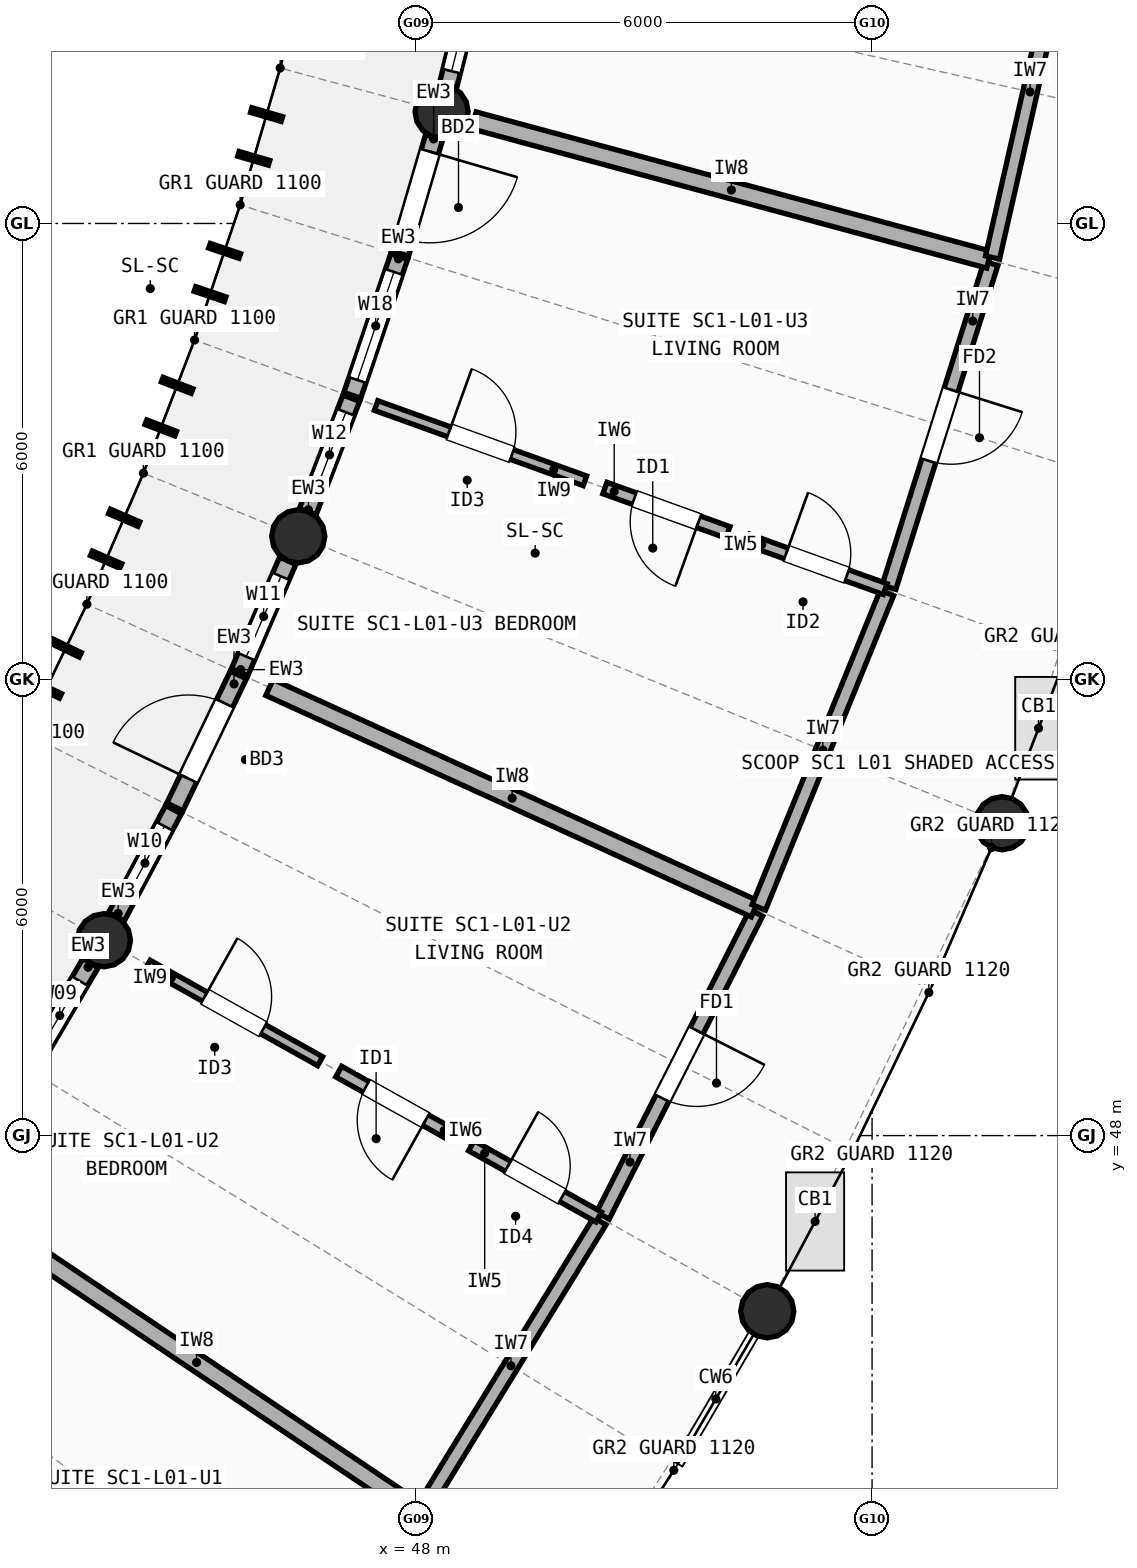
"""IFC4 building model, lengths in metres.
Left out: names, types, materials, properties, quantities, classifications, styles, units other than length and angle.
Written with IfcOpenShell. Run it as: python <this file> out.ifc"""

import sys

from ifc_helpers import new_model, si_unit, direction, frame, frame_2d, origin, origin_2d, place, context, subcontext, project, spatial, rectangle, circle, extrude, element, fill, save


model = new_model("IFC4")
c1 = context("Model", 3, precision=1e-05, world=origin(), true_north=direction((0.0, 1.0)))
c2 = subcontext(c1, "Body", "Model", "MODEL_VIEW")
j1 = project(units=[si_unit("LENGTHUNIT", "METRE"), si_unit("PLANEANGLEUNIT", "RADIAN")], contexts=[c1])
p1 = place(None, origin())
s1 = spatial("IfcSite", under=j1, at=p1, CompositionType="ELEMENT")
p2 = place(p1, origin())
s2 = spatial("IfcBuilding", under=s1, at=p2, CompositionType="ELEMENT")
p3 = place(p2, frame((0.0, 0.0, 4.5)))
s3 = spatial("IfcBuildingStorey", under=s2, at=p3, CompositionType="ELEMENT", Elevation=4.5)
for number, where, z_axis, x_axis in (
    (1, (43.893, 50.57, 0.0), (0.0, 0.0, 1.0), (1.0, 0.0, 0.0)),
    (2, (52.621, 45.689, 0.0), (0.0, 0.0, 1.0), (1.0, 0.0, 0.0)),
    (3, (46.45, 55.884, 0.0), (0.0, 0.0, 1.0), (1.0, 0.0, 0.0)),
    (4, (55.71, 52.11, 0.0), (0.0, 0.0, 1.0), (1.0, 0.0, 0.0)),
    (5, (48.336, 61.471, 0.0), (0.0, 0.0, 1.0), (1.0, 0.0, 0.0)),
):
    element("IfcColumn", number, at=place(p3, frame(where, z_axis=z_axis, x_axis=x_axis)), inside=s3, PredefinedType="COLUMN", context=c2, shape_type="SweptSolid", body=[
        extrude(circle(Radius=0.35, at=origin_2d()), origin(), (0.0, 0.0, 1.0), 2.948),
    ])
p4 = place(p3, frame((42.908, 48.891, 0.0), z_axis=(0.0, 0.0, 1.0), x_axis=(0.505970625323, 0.862550709414, 0.0)))
e6 = element("IfcWall", 6, at=p4, inside=s3, PredefinedType="STANDARD", context=c2, shape_type="SweptSolid", body=[
    extrude(rectangle(XDim=1.597, YDim=0.235, at=frame_2d((0.798, 0.0))), origin(), (0.0, 0.0, 1.0), 2.684),
])
p5 = place(p4, frame((0.273, 0.0, 0.85)))
e7 = element("IfcOpeningElement", 7, at=p5, cuts=e6, PredefinedType="OPENING", context=c2, shape_type="SweptSolid", body=[
    extrude(rectangle(XDim=1.05, YDim=1.35, at=frame_2d((0.525, 0.675))), frame((0.0, 0.127, 0.0), z_axis=(0.0, -1.0, 0.0), x_axis=(1.0, 0.0, 0.0)), (0.0, 0.0, 1.0), 0.255),
])
p6 = place(p3, frame((44.058, 50.879, 0.0), z_axis=(0.0, 0.0, 1.0), x_axis=(0.470183436771, 0.882568714484, 0.0)))
e8 = element("IfcWall", 8, at=p6, inside=s3, PredefinedType="STANDARD", context=c2, shape_type="SweptSolid", body=[
    extrude(rectangle(XDim=1.597, YDim=0.235, at=frame_2d((0.798, 0.0))), origin(), (0.0, 0.0, 1.0), 2.684),
])
p7 = place(p6, frame((0.248, 0.0, 0.85)))
e9 = element("IfcOpeningElement", 9, at=p7, cuts=e8, PredefinedType="OPENING", context=c2, shape_type="SweptSolid", body=[
    extrude(rectangle(XDim=1.1, YDim=1.45, at=frame_2d((0.55, 0.725))), frame((0.0, 0.127, 0.0), z_axis=(0.0, -1.0, 0.0), x_axis=(1.0, 0.0, 0.0)), (0.0, 0.0, 1.0), 0.255),
])
p8 = place(p3, frame((44.826, 52.324, 0.0), z_axis=(0.0, 0.0, 1.0), x_axis=(0.433579410465, 0.90111536155, 0.0)))
e10 = element("IfcWall", 10, at=p8, inside=s3, PredefinedType="STANDARD", context=c2, shape_type="SweptSolid", body=[
    extrude(rectangle(XDim=1.927, YDim=0.235, at=frame_2d((0.963, 0.0))), origin(), (0.0, 0.0, 1.0), 2.684),
])
p9 = place(p8, frame((0.413, 0.0, 0.0)))
e11 = element("IfcOpeningElement", 11, at=p9, cuts=e10, PredefinedType="OPENING", context=c2, shape_type="SweptSolid", body=[
    extrude(rectangle(XDim=1.1, YDim=2.15, at=frame_2d((0.55, 1.075))), frame((0.0, 0.127, 0.0), z_axis=(0.0, -1.0, 0.0), x_axis=(1.0, 0.0, 0.0)), (0.0, 0.0, 1.0), 0.255),
])
p10 = place(p3, frame((45.678, 54.097, 0.0), z_axis=(0.0, 0.0, 1.0), x_axis=(0.396353998836, 0.918097765822, 0.0)))
e12 = element("IfcWall", 12, at=p10, inside=s3, PredefinedType="STANDARD", context=c2, shape_type="SweptSolid", body=[
    extrude(rectangle(XDim=1.597, YDim=0.235, at=frame_2d((0.798, 0.0))), origin(), (0.0, 0.0, 1.0), 2.684),
])
p11 = place(p10, frame((0.223, 0.0, 0.85)))
e13 = element("IfcOpeningElement", 13, at=p11, cuts=e12, PredefinedType="OPENING", context=c2, shape_type="SweptSolid", body=[
    extrude(rectangle(XDim=1.15, YDim=1.45, at=frame_2d((0.575, 0.725))), frame((0.0, 0.127, 0.0), z_axis=(0.0, -1.0, 0.0), x_axis=(1.0, 0.0, 0.0)), (0.0, 0.0, 1.0), 0.255),
])
p12 = place(p3, frame((46.575, 56.211, 0.0), z_axis=(0.0, 0.0, 1.0), x_axis=(0.358384767005, 0.933573970705, 0.0)))
e14 = element("IfcWall", 14, at=p12, inside=s3, PredefinedType="STANDARD", context=c2, shape_type="SweptSolid", body=[
    extrude(rectangle(XDim=1.597, YDim=0.235, at=frame_2d((0.798, 0.0))), origin(), (0.0, 0.0, 1.0), 2.684),
])
p13 = place(p12, frame((0.198, 0.0, 0.85)))
e15 = element("IfcOpeningElement", 15, at=p13, cuts=e14, PredefinedType="OPENING", context=c2, shape_type="SweptSolid", body=[
    extrude(rectangle(XDim=1.2, YDim=1.35, at=frame_2d((0.6, 0.675))), frame((0.0, 0.127, 0.0), z_axis=(0.0, -1.0, 0.0), x_axis=(1.0, 0.0, 0.0)), (0.0, 0.0, 1.0), 0.255),
])
p14 = place(p3, frame((47.161, 57.739, 0.0), z_axis=(0.0, 0.0, 1.0), x_axis=(0.319798549746, 0.947485560618, 0.0)))
e16 = element("IfcWall", 16, at=p14, inside=s3, PredefinedType="STANDARD", context=c2, shape_type="SweptSolid", body=[
    extrude(rectangle(XDim=1.927, YDim=0.235, at=frame_2d((0.963, 0.0))), origin(), (0.0, 0.0, 1.0), 2.684),
])
p15 = place(p14, frame((0.213, 0.0, 0.85)))
e17 = element("IfcOpeningElement", 17, at=p15, cuts=e16, PredefinedType="OPENING", context=c2, shape_type="SweptSolid", body=[
    extrude(rectangle(XDim=1.5, YDim=1.4, at=frame_2d((0.75, 0.7))), frame((0.0, 0.127, 0.0), z_axis=(0.0, -1.0, 0.0), x_axis=(1.0, 0.0, 0.0)), (0.0, 0.0, 1.0), 0.255),
])
p16 = place(p3, frame((47.79, 59.603, 0.0), z_axis=(0.0, 0.0, 1.0), x_axis=(0.28073386291, 0.959785652224, 0.0)))
e18 = element("IfcWall", 18, at=p16, inside=s3, PredefinedType="STANDARD", context=c2, shape_type="SweptSolid", body=[
    extrude(rectangle(XDim=1.597, YDim=0.235, at=frame_2d((0.798, 0.0))), origin(), (0.0, 0.0, 1.0), 2.684),
])
p17 = place(p16, frame((0.198, 0.0, 0.0)))
e19 = element("IfcOpeningElement", 19, at=p17, cuts=e18, PredefinedType="OPENING", context=c2, shape_type="SweptSolid", body=[
    extrude(rectangle(XDim=1.2, YDim=2.15, at=frame_2d((0.6, 1.075))), frame((0.0, 0.127, 0.0), z_axis=(0.0, -1.0, 0.0), x_axis=(1.0, 0.0, 0.0)), (0.0, 0.0, 1.0), 0.255),
])
p18 = place(p3, frame((48.42, 61.811, 0.0), z_axis=(0.0, 0.0, 1.0), x_axis=(0.241240447943, 0.970465376135, 0.0)))
e20 = element("IfcWall", 20, at=p18, inside=s3, PredefinedType="STANDARD", context=c2, shape_type="SweptSolid", body=[
    extrude(rectangle(XDim=1.597, YDim=0.235, at=frame_2d((0.798, 0.0))), origin(), (0.0, 0.0, 1.0), 2.684),
])
p19 = place(p18, frame((0.198, 0.0, 0.85)))
e21 = element("IfcOpeningElement", 21, at=p19, cuts=e20, PredefinedType="OPENING", context=c2, shape_type="SweptSolid", body=[
    extrude(rectangle(XDim=1.2, YDim=1.5, at=frame_2d((0.6, 0.75))), frame((0.0, 0.127, 0.0), z_axis=(0.0, -1.0, 0.0), x_axis=(1.0, 0.0, 0.0)), (0.0, 0.0, 1.0), 0.255),
])
p20 = place(p3, frame((42.2, 46.974, 0.0), z_axis=(0.0, 0.0, 1.0), x_axis=(0.82987699708, -0.55794638606, 0.0)))
e22 = element("IfcWall", 22, at=p20, inside=s3, PredefinedType="SOLIDWALL", context=c2, shape_type="SweptSolid", body=[
    extrude(rectangle(XDim=7.02, YDim=0.23, at=frame_2d((3.51, 0.0))), origin(), (0.0, 0.0, 1.0), 2.742),
])
p21 = place(p3, frame((48.08, 43.069, 0.0), z_axis=(0.0, 0.0, 1.0), x_axis=(0.523444746739, 0.852059620632, 0.0)))
e23 = element("IfcWall", 23, at=p21, inside=s3, PredefinedType="SOLIDWALL", context=c2, shape_type="SweptSolid", body=[
    extrude(rectangle(XDim=4.467, YDim=0.19, at=frame_2d((2.234, 0.0))), origin(), (0.0, 0.0, 1.0), 2.762),
])
p22 = place(p3, frame((50.457, 46.945, 0.0), z_axis=(0.0, 0.0, 1.0), x_axis=(0.451972910967, 0.892031662976, 0.0)))
e24 = element("IfcWall", 24, at=p22, inside=s3, PredefinedType="SOLIDWALL", context=c2, shape_type="SweptSolid", body=[
    extrude(rectangle(XDim=4.467, YDim=0.19, at=frame_2d((2.234, 0.0))), origin(), (0.0, 0.0, 1.0), 2.742),
])
p23 = place(p22, frame((1.734, 0.0, 0.0)))
e25 = element("IfcOpeningElement", 25, at=p23, cuts=e24, PredefinedType="OPENING", context=c2, shape_type="SweptSolid", body=[
    extrude(rectangle(XDim=1.0, YDim=2.15, at=frame_2d((0.5, 1.075))), frame((0.0, 0.105, 0.0), z_axis=(0.0, -1.0, 0.0), x_axis=(1.0, 0.0, 0.0)), (0.0, 0.0, 1.0), 0.21),
])
p24 = place(p3, frame((44.469, 50.248, 0.0), z_axis=(0.0, 0.0, 1.0), x_axis=(0.872794081277, -0.488088610487, 0.0)))
e26 = element("IfcWall", 26, at=p24, inside=s3, PredefinedType="PARTITIONING", context=c2, shape_type="SweptSolid", body=[
    extrude(rectangle(XDim=2.6, YDim=0.135, at=frame_2d((1.3, 0.0))), origin(), (0.0, 0.0, 1.0), 2.722),
])
p25 = place(p24, frame((0.86, 0.0, 0.0)))
e27 = element("IfcOpeningElement", 27, at=p25, cuts=e26, PredefinedType="OPENING", context=c2, shape_type="SweptSolid", body=[
    extrude(rectangle(XDim=0.88, YDim=2.1, at=frame_2d((0.44, 1.05))), frame((0.0, 0.077, 0.0), z_axis=(0.0, -1.0, 0.0), x_axis=(1.0, 0.0, 0.0)), (0.0, 0.0, 1.0), 0.155),
])
p26 = place(p3, frame((46.983, 48.842, 0.0), z_axis=(0.0, 0.0, 1.0), x_axis=(0.872774545553, -0.48812354239, 0.0)))
e28 = element("IfcWall", 28, at=p26, inside=s3, PredefinedType="PLUMBINGWALL", context=c2, shape_type="SweptSolid", body=[
    extrude(rectangle(XDim=1.72, YDim=0.16, at=frame_2d((0.86, 0.0))), origin(), (0.0, 0.0, 1.0), 2.722),
])
p27 = place(p26, frame((0.41, 0.0, 0.0)))
e29 = element("IfcOpeningElement", 29, at=p27, cuts=e28, PredefinedType="OPENING", context=c2, shape_type="SweptSolid", body=[
    extrude(rectangle(XDim=0.9, YDim=2.1, at=frame_2d((0.45, 1.05))), frame((0.0, 0.09, 0.0), z_axis=(0.0, -1.0, 0.0), x_axis=(1.0, 0.0, 0.0)), (0.0, 0.0, 1.0), 0.18),
])
p28 = place(p3, frame((48.728, 47.866, 0.0), z_axis=(0.0, 0.0, 1.0), x_axis=(0.8728224149, -0.488037941198, 0.0)))
e30 = element("IfcWall", 30, at=p28, inside=s3, PredefinedType="PARTITIONING", context=c2, shape_type="SweptSolid", body=[
    extrude(rectangle(XDim=1.92, YDim=0.15, at=frame_2d((0.96, 0.0))), origin(), (0.0, 0.0, 1.0), 2.722),
])
p29 = place(p28, frame((0.55, 0.0, 0.0)))
e31 = element("IfcOpeningElement", 31, at=p29, cuts=e30, PredefinedType="OPENING", context=c2, shape_type="SweptSolid", body=[
    extrude(rectangle(XDim=0.82, YDim=2.08, at=frame_2d((0.41, 1.04))), frame((0.0, 0.085, 0.0), z_axis=(0.0, -1.0, 0.0), x_axis=(1.0, 0.0, 0.0)), (0.0, 0.0, 1.0), 0.17),
])
p30 = place(p3, frame((46.071, 53.896, 0.0), z_axis=(0.0, 0.0, 1.0), x_axis=(0.909807068599, -0.415031442095, 0.0)))
e32 = element("IfcWall", 32, at=p30, inside=s3, PredefinedType="SOLIDWALL", context=c2, shape_type="SweptSolid", body=[
    extrude(rectangle(XDim=7.02, YDim=0.23, at=frame_2d((3.51, 0.0))), origin(), (0.0, 0.0, 1.0), 2.762),
])
p31 = place(p3, frame((52.509, 51.002, 0.0), z_axis=(0.0, 0.0, 1.0), x_axis=(0.377413192487, 0.926044967665, 0.0)))
e33 = element("IfcWall", 33, at=p31, inside=s3, PredefinedType="SOLIDWALL", context=c2, shape_type="SweptSolid", body=[
    extrude(rectangle(XDim=4.467, YDim=0.19, at=frame_2d((2.234, 0.0))), origin(), (0.0, 0.0, 1.0), 2.722),
])
p32 = place(p3, frame((54.222, 55.215, 0.0), z_axis=(0.0, 0.0, 1.0), x_axis=(0.300377958446, 0.953820256694, 0.0)))
e34 = element("IfcWall", 34, at=p32, inside=s3, PredefinedType="SOLIDWALL", context=c2, shape_type="SweptSolid", body=[
    extrude(rectangle(XDim=4.467, YDim=0.19, at=frame_2d((2.233, 0.0))), origin(), (0.0, 0.0, 1.0), 2.762),
])
p33 = place(p32, frame((1.743, 0.0, 0.0)))
e35 = element("IfcOpeningElement", 35, at=p33, cuts=e34, PredefinedType="OPENING", context=c2, shape_type="SweptSolid", body=[
    extrude(rectangle(XDim=0.98, YDim=2.15, at=frame_2d((0.49, 1.075))), frame((0.0, 0.105, 0.0), z_axis=(0.0, -1.0, 0.0), x_axis=(1.0, 0.0, 0.0)), (0.0, 0.0, 1.0), 0.21),
])
p34 = place(p3, frame((47.475, 57.605, 0.0), z_axis=(0.0, 0.0, 1.0), x_axis=(0.940746643475, -0.33911023693, 0.0)))
e36 = element("IfcWall", 36, at=p34, inside=s3, PredefinedType="PARTITIONING", context=c2, shape_type="SweptSolid", body=[
    extrude(rectangle(XDim=2.92, YDim=0.135, at=frame_2d((1.46, 0.0))), origin(), (0.0, 0.0, 1.0), 2.742),
])
p35 = place(p34, frame((1.02, 0.0, 0.0)))
e37 = element("IfcOpeningElement", 37, at=p35, cuts=e36, PredefinedType="OPENING", context=c2, shape_type="SweptSolid", body=[
    extrude(rectangle(XDim=0.88, YDim=2.1, at=frame_2d((0.44, 1.05))), frame((0.0, 0.077, 0.0), z_axis=(0.0, -1.0, 0.0), x_axis=(1.0, 0.0, 0.0)), (0.0, 0.0, 1.0), 0.155),
])
p36 = place(p3, frame((50.485, 56.519, 0.0), z_axis=(0.0, 0.0, 1.0), x_axis=(0.940738931862, -0.339131629428, 0.0)))
e38 = element("IfcWall", 38, at=p36, inside=s3, PredefinedType="PLUMBINGWALL", context=c2, shape_type="SweptSolid", body=[
    extrude(rectangle(XDim=1.72, YDim=0.16, at=frame_2d((0.86, 0.0))), origin(), (0.0, 0.0, 1.0), 2.742),
])
p37 = place(p36, frame((0.41, 0.0, 0.0)))
e39 = element("IfcOpeningElement", 39, at=p37, cuts=e38, PredefinedType="OPENING", context=c2, shape_type="SweptSolid", body=[
    extrude(rectangle(XDim=0.9, YDim=2.1, at=frame_2d((0.45, 1.05))), frame((0.0, 0.09, 0.0), z_axis=(0.0, -1.0, 0.0), x_axis=(1.0, 0.0, 0.0)), (0.0, 0.0, 1.0), 0.18),
])
p38 = place(p3, frame((52.366, 55.841, 0.0), z_axis=(0.0, 0.0, 1.0), x_axis=(0.94073656273, -0.339138201244, 0.0)))
e40 = element("IfcWall", 40, at=p38, inside=s3, PredefinedType="PARTITIONING", context=c2, shape_type="SweptSolid", body=[
    extrude(rectangle(XDim=1.92, YDim=0.15, at=frame_2d((0.96, 0.0))), origin(), (0.0, 0.0, 1.0), 2.742),
])
p39 = place(p38, frame((0.535, 0.0, 0.0)))
e41 = element("IfcOpeningElement", 41, at=p39, cuts=e40, PredefinedType="OPENING", context=c2, shape_type="SweptSolid", body=[
    extrude(rectangle(XDim=0.85, YDim=2.1, at=frame_2d((0.425, 1.05))), frame((0.0, 0.085, 0.0), z_axis=(0.0, -1.0, 0.0), x_axis=(1.0, 0.0, 0.0)), (0.0, 0.0, 1.0), 0.17),
])
p40 = place(p3, frame((48.761, 61.356, 0.0), z_axis=(0.0, 0.0, 1.0), x_axis=(0.965329768393, -0.26103340448, 0.0)))
e42 = element("IfcWall", 42, at=p40, inside=s3, PredefinedType="SOLIDWALL", context=c2, shape_type="SweptSolid", body=[
    extrude(rectangle(XDim=7.02, YDim=0.23, at=frame_2d((3.51, 0.0))), origin(), (0.0, 0.0, 1.0), 2.722),
])
p41 = place(p3, frame((55.585, 59.552, 0.0), z_axis=(0.0, 0.0, 1.0), x_axis=(0.221221895428, 0.97522349899, 0.0)))
e43 = element("IfcWall", 43, at=p41, inside=s3, PredefinedType="SOLIDWALL", context=c2, shape_type="SweptSolid", body=[
    extrude(rectangle(XDim=4.467, YDim=0.19, at=frame_2d((2.234, 0.0))), origin(), (0.0, 0.0, 1.0), 2.742),
])
p42 = place(p5, origin())
e44 = element("IfcWindow", 44, at=p42, inside=s3, PartitioningType="SINGLE_PANEL", PredefinedType="WINDOW", context=c2, shape_type="SweptSolid", body=[
    extrude(rectangle(XDim=1.05, YDim=1.35, at=frame_2d((0.525, 0.675))), frame((0.0, 0.03, 0.0), z_axis=(0.0, -1.0, 0.0), x_axis=(1.0, 0.0, 0.0)), (0.0, 0.0, 1.0), 0.06),
])
fill(e7, e44)
p43 = place(p7, origin())
e45 = element("IfcWindow", 45, at=p43, inside=s3, PartitioningType="SINGLE_PANEL", PredefinedType="WINDOW", context=c2, shape_type="SweptSolid", body=[
    extrude(rectangle(XDim=1.1, YDim=1.45, at=frame_2d((0.55, 0.725))), frame((0.0, 0.03, 0.0), z_axis=(0.0, -1.0, 0.0), x_axis=(1.0, 0.0, 0.0)), (0.0, 0.0, 1.0), 0.06),
])
fill(e9, e45)
p44 = place(p9, origin())
e46 = element("IfcDoor", 46, at=p44, inside=s3, OperationType="SINGLE_SWING_LEFT", PredefinedType="DOOR", context=c2, shape_type="SweptSolid", body=[
    extrude(rectangle(XDim=1.1, YDim=2.15, at=frame_2d((0.55, 1.075))), frame((0.0, 0.025, 0.0), z_axis=(0.0, -1.0, 0.0), x_axis=(1.0, 0.0, 0.0)), (0.0, 0.0, 1.0), 0.05),
])
fill(e11, e46)
p45 = place(p11, origin())
e47 = element("IfcWindow", 47, at=p45, inside=s3, PartitioningType="SINGLE_PANEL", PredefinedType="WINDOW", context=c2, shape_type="SweptSolid", body=[
    extrude(rectangle(XDim=1.15, YDim=1.45, at=frame_2d((0.575, 0.725))), frame((0.0, 0.03, 0.0), z_axis=(0.0, -1.0, 0.0), x_axis=(1.0, 0.0, 0.0)), (0.0, 0.0, 1.0), 0.06),
])
fill(e13, e47)
p46 = place(p13, origin())
e48 = element("IfcWindow", 48, at=p46, inside=s3, PartitioningType="SINGLE_PANEL", PredefinedType="WINDOW", context=c2, shape_type="SweptSolid", body=[
    extrude(rectangle(XDim=1.2, YDim=1.35, at=frame_2d((0.6, 0.675))), frame((0.0, 0.03, 0.0), z_axis=(0.0, -1.0, 0.0), x_axis=(1.0, 0.0, 0.0)), (0.0, 0.0, 1.0), 0.06),
])
fill(e15, e48)
p47 = place(p15, origin())
e49 = element("IfcWindow", 49, at=p47, inside=s3, PartitioningType="SINGLE_PANEL", PredefinedType="WINDOW", context=c2, shape_type="SweptSolid", body=[
    extrude(rectangle(XDim=1.5, YDim=1.4, at=frame_2d((0.75, 0.7))), frame((0.0, 0.03, 0.0), z_axis=(0.0, -1.0, 0.0), x_axis=(1.0, 0.0, 0.0)), (0.0, 0.0, 1.0), 0.06),
])
fill(e17, e49)
p48 = place(p17, origin())
e50 = element("IfcDoor", 50, at=p48, inside=s3, OperationType="SINGLE_SWING_RIGHT", PredefinedType="DOOR", context=c2, shape_type="SweptSolid", body=[
    extrude(rectangle(XDim=1.2, YDim=2.15, at=frame_2d((0.6, 1.075))), frame((0.0, 0.025, 0.0), z_axis=(0.0, -1.0, 0.0), x_axis=(1.0, 0.0, 0.0)), (0.0, 0.0, 1.0), 0.05),
])
fill(e19, e50)
p49 = place(p19, origin())
e51 = element("IfcWindow", 51, at=p49, inside=s3, PartitioningType="SINGLE_PANEL", PredefinedType="WINDOW", context=c2, shape_type="SweptSolid", body=[
    extrude(rectangle(XDim=1.2, YDim=1.5, at=frame_2d((0.6, 0.75))), frame((0.0, 0.03, 0.0), z_axis=(0.0, -1.0, 0.0), x_axis=(1.0, 0.0, 0.0)), (0.0, 0.0, 1.0), 0.06),
])
fill(e21, e51)
p50 = place(p23, origin())
e52 = element("IfcDoor", 52, at=p50, inside=s3, OperationType="SINGLE_SWING_RIGHT", PredefinedType="DOOR", context=c2, shape_type="SweptSolid", body=[
    extrude(rectangle(XDim=1.0, YDim=2.15, at=frame_2d((0.5, 1.075))), frame((0.0, 0.025, 0.0), z_axis=(0.0, -1.0, 0.0), x_axis=(1.0, 0.0, 0.0)), (0.0, 0.0, 1.0), 0.05),
])
fill(e25, e52)
p51 = place(p25, origin())
e53 = element("IfcDoor", 53, at=p51, inside=s3, OperationType="SINGLE_SWING_LEFT", PredefinedType="DOOR", context=c2, shape_type="SweptSolid", body=[
    extrude(rectangle(XDim=0.88, YDim=2.1, at=frame_2d((0.44, 1.05))), frame((0.0, 0.025, 0.0), z_axis=(0.0, -1.0, 0.0), x_axis=(1.0, 0.0, 0.0)), (0.0, 0.0, 1.0), 0.05),
])
fill(e27, e53)
p52 = place(p27, origin())
e54 = element("IfcDoor", 54, at=p52, inside=s3, OperationType="SINGLE_SWING_RIGHT", PredefinedType="DOOR", context=c2, shape_type="SweptSolid", body=[
    extrude(rectangle(XDim=0.9, YDim=2.1, at=frame_2d((0.45, 1.05))), frame((0.0, 0.025, 0.0), z_axis=(0.0, -1.0, 0.0), x_axis=(1.0, 0.0, 0.0)), (0.0, 0.0, 1.0), 0.05),
])
fill(e29, e54)
p53 = place(p29, origin())
e55 = element("IfcDoor", 55, at=p53, inside=s3, OperationType="SINGLE_SWING_LEFT", PredefinedType="DOOR", context=c2, shape_type="SweptSolid", body=[
    extrude(rectangle(XDim=0.82, YDim=2.08, at=frame_2d((0.41, 1.04))), frame((0.0, 0.025, 0.0), z_axis=(0.0, -1.0, 0.0), x_axis=(1.0, 0.0, 0.0)), (0.0, 0.0, 1.0), 0.05),
])
fill(e31, e55)
p54 = place(p33, origin())
e56 = element("IfcDoor", 56, at=p54, inside=s3, OperationType="SINGLE_SWING_RIGHT", PredefinedType="DOOR", context=c2, shape_type="SweptSolid", body=[
    extrude(rectangle(XDim=0.98, YDim=2.15, at=frame_2d((0.49, 1.075))), frame((0.0, 0.025, 0.0), z_axis=(0.0, -1.0, 0.0), x_axis=(1.0, 0.0, 0.0)), (0.0, 0.0, 1.0), 0.05),
])
fill(e35, e56)
p55 = place(p35, origin())
e57 = element("IfcDoor", 57, at=p55, inside=s3, OperationType="SINGLE_SWING_LEFT", PredefinedType="DOOR", context=c2, shape_type="SweptSolid", body=[
    extrude(rectangle(XDim=0.88, YDim=2.1, at=frame_2d((0.44, 1.05))), frame((0.0, 0.025, 0.0), z_axis=(0.0, -1.0, 0.0), x_axis=(1.0, 0.0, 0.0)), (0.0, 0.0, 1.0), 0.05),
])
fill(e37, e57)
p56 = place(p37, origin())
e58 = element("IfcDoor", 58, at=p56, inside=s3, OperationType="SINGLE_SWING_RIGHT", PredefinedType="DOOR", context=c2, shape_type="SweptSolid", body=[
    extrude(rectangle(XDim=0.9, YDim=2.1, at=frame_2d((0.45, 1.05))), frame((0.0, 0.025, 0.0), z_axis=(0.0, -1.0, 0.0), x_axis=(1.0, 0.0, 0.0)), (0.0, 0.0, 1.0), 0.05),
])
fill(e39, e58)
p57 = place(p39, origin())
e59 = element("IfcDoor", 59, at=p57, inside=s3, OperationType="SINGLE_SWING_LEFT", PredefinedType="DOOR", context=c2, shape_type="SweptSolid", body=[
    extrude(rectangle(XDim=0.85, YDim=2.1, at=frame_2d((0.425, 1.05))), frame((0.0, 0.025, 0.0), z_axis=(0.0, -1.0, 0.0), x_axis=(1.0, 0.0, 0.0)), (0.0, 0.0, 1.0), 0.05),
])
fill(e41, e59)
save(model, sys.argv[1])
